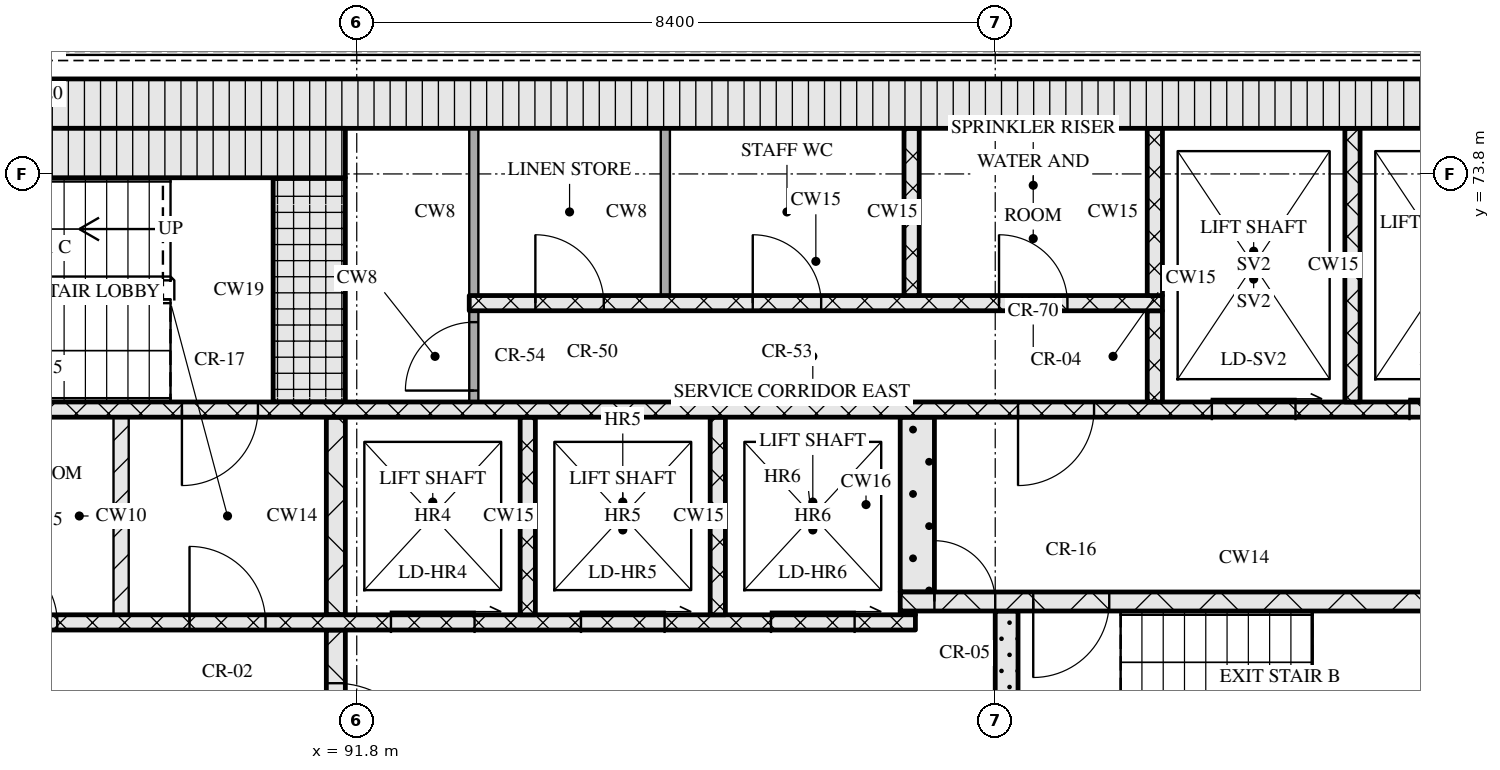
"""IFC4 building model, lengths in metres.
Left out: names, types, materials, properties, quantities, classifications, styles, units other than length and angle.
Written with IfcOpenShell. Run it as: python <this file> out.ifc"""

import sys

from ifc_helpers import new_model, si_unit, direction, frame, frame_2d, origin, place, context, subcontext, project, spatial, rectangle, extrude, element, fill, save


model = new_model("IFC4")
c1 = context("Model", 3, precision=1e-05, world=origin(), true_north=direction((0.0, 1.0)))
c2 = subcontext(c1, "Body", "Model", "MODEL_VIEW")
j1 = project(units=[si_unit("LENGTHUNIT", "METRE"), si_unit("PLANEANGLEUNIT", "RADIAN")], contexts=[c1])
p1 = place(None, origin())
s1 = spatial("IfcSite", under=j1, at=p1, CompositionType="ELEMENT")
p2 = place(p1, origin())
s2 = spatial("IfcBuilding", under=s1, at=p2, CompositionType="ELEMENT")
p3 = place(p2, frame((0.0, 0.0, 209.1)))
s3 = spatial("IfcBuildingStorey", under=s2, at=p3, CompositionType="ELEMENT", Elevation=209.1)
p4 = place(p3, frame((67.15, 74.725, 0.0), z_axis=(0.0, 0.0, 1.0), x_axis=(1.0, 0.0, 0.0)))
e1 = element("IfcWall", 1, at=p4, inside=s3, PredefinedType="SOLIDWALL", context=c2, shape_type="SweptSolid", body=[
    extrude(rectangle(XDim=40.9, YDim=0.65, at=frame_2d((20.45, 0.0))), origin(), (0.0, 0.0, 1.0), 3.32),
])
p5 = place(p3, frame((91.525, 65.2, 0.0), z_axis=(0.0, 0.0, 1.0), x_axis=(0.0, 1.0, 0.0)))
e2 = element("IfcWall", 2, at=p5, inside=s3, PredefinedType="SOLIDWALL", context=c2, shape_type="SweptSolid", body=[
    extrude(rectangle(XDim=2.6, YDim=0.25, at=frame_2d((1.3, 0.0))), origin(), (0.0, 0.0, 1.0), 3.32),
])
p6 = place(p5, frame((0.7, 0.0, 0.0)))
e3 = element("IfcOpeningElement", 3, at=p6, cuts=e2, PredefinedType="OPENING", context=c2, shape_type="SweptSolid", body=[
    extrude(rectangle(XDim=1.2, YDim=2.1, at=frame_2d((0.6, 1.05))), frame((0.0, 0.135, 0.0), z_axis=(0.0, -1.0, 0.0), x_axis=(1.0, 0.0, 0.0)), (0.0, 0.0, 1.0), 0.27),
])
p7 = place(p3, frame((100.35, 65.2, 0.0), z_axis=(0.0, 0.0, 1.0), x_axis=(0.0, 1.0, 0.0)))
e4 = element("IfcWall", 4, at=p7, inside=s3, PredefinedType="SOLIDWALL", context=c2, shape_type="SweptSolid", body=[
    extrude(rectangle(XDim=2.85, YDim=0.3, at=frame_2d((1.425, 0.0))), origin(), (0.0, 0.0, 1.0), 3.32),
])
p8 = place(p3, frame((76.05, 67.9, 0.0), z_axis=(0.0, 0.0, 1.0), x_axis=(1.0, 0.0, 0.0)))
e5 = element("IfcWall", 5, at=p8, inside=s3, PredefinedType="SOLIDWALL", context=c2, shape_type="SweptSolid", body=[
    extrude(rectangle(XDim=23.1, YDim=0.2, at=frame_2d((11.55, 0.0))), origin(), (0.0, 0.0, 1.0), 3.32),
])
p9 = place(p8, frame((1.4, 0.0, 0.0)))
e6 = element("IfcOpeningElement", 6, at=p9, cuts=e5, PredefinedType="OPENING", context=c2, shape_type="SweptSolid", body=[
    extrude(rectangle(XDim=0.9, YDim=2.1, at=frame_2d((0.45, 1.05))), frame((0.0, 0.11, 0.0), z_axis=(0.0, -1.0, 0.0), x_axis=(1.0, 0.0, 0.0)), (0.0, 0.0, 1.0), 0.22),
])
p10 = place(p8, frame((5.11, 0.0, 0.0)))
e7 = element("IfcOpeningElement", 7, at=p10, cuts=e5, PredefinedType="OPENING", context=c2, shape_type="SweptSolid", body=[
    extrude(rectangle(XDim=0.9, YDim=2.1, at=frame_2d((0.45, 1.05))), frame((0.0, 0.11, 0.0), z_axis=(0.0, -1.0, 0.0), x_axis=(1.0, 0.0, 0.0)), (0.0, 0.0, 1.0), 0.22),
])
p11 = place(p8, frame((8.45, 0.0, 0.0)))
e8 = element("IfcOpeningElement", 8, at=p11, cuts=e5, PredefinedType="OPENING", context=c2, shape_type="SweptSolid", body=[
    extrude(rectangle(XDim=0.9, YDim=2.1, at=frame_2d((0.45, 1.05))), frame((0.0, 0.11, 0.0), z_axis=(0.0, -1.0, 0.0), x_axis=(1.0, 0.0, 0.0)), (0.0, 0.0, 1.0), 0.22),
])
p12 = place(p8, frame((10.91, 0.0, 0.0)))
e9 = element("IfcOpeningElement", 9, at=p12, cuts=e5, PredefinedType="OPENING", context=c2, shape_type="SweptSolid", body=[
    extrude(rectangle(XDim=0.9, YDim=2.1, at=frame_2d((0.45, 1.05))), frame((0.0, 0.11, 0.0), z_axis=(0.0, -1.0, 0.0), x_axis=(1.0, 0.0, 0.0)), (0.0, 0.0, 1.0), 0.22),
])
p13 = place(p8, frame((13.55, 0.0, 0.0)))
e10 = element("IfcOpeningElement", 10, at=p13, cuts=e5, PredefinedType="OPENING", context=c2, shape_type="SweptSolid", body=[
    extrude(rectangle(XDim=1.0, YDim=2.1, at=frame_2d((0.5, 1.05))), frame((0.0, 0.11, 0.0), z_axis=(0.0, -1.0, 0.0), x_axis=(1.0, 0.0, 0.0)), (0.0, 0.0, 1.0), 0.22),
])
p14 = place(p8, frame((16.2, 0.0, 0.0)))
e11 = element("IfcOpeningElement", 11, at=p14, cuts=e5, PredefinedType="OPENING", context=c2, shape_type="SweptSolid", body=[
    extrude(rectangle(XDim=1.1, YDim=2.1, at=frame_2d((0.55, 1.05))), frame((0.0, 0.11, 0.0), z_axis=(0.0, -1.0, 0.0), x_axis=(1.0, 0.0, 0.0)), (0.0, 0.0, 1.0), 0.22),
])
p15 = place(p8, frame((18.7, 0.0, 0.0)))
e12 = element("IfcOpeningElement", 12, at=p15, cuts=e5, PredefinedType="OPENING", context=c2, shape_type="SweptSolid", body=[
    extrude(rectangle(XDim=1.1, YDim=2.1, at=frame_2d((0.55, 1.05))), frame((0.0, 0.11, 0.0), z_axis=(0.0, -1.0, 0.0), x_axis=(1.0, 0.0, 0.0)), (0.0, 0.0, 1.0), 0.22),
])
p16 = place(p8, frame((21.2, 0.0, 0.0)))
e13 = element("IfcOpeningElement", 13, at=p16, cuts=e5, PredefinedType="OPENING", context=c2, shape_type="SweptSolid", body=[
    extrude(rectangle(XDim=1.1, YDim=2.1, at=frame_2d((0.55, 1.05))), frame((0.0, 0.11, 0.0), z_axis=(0.0, -1.0, 0.0), x_axis=(1.0, 0.0, 0.0)), (0.0, 0.0, 1.0), 0.22),
])
p17 = place(p3, frame((88.7, 68.0, 0.0), z_axis=(0.0, 0.0, 1.0), x_axis=(0.0, 1.0, 0.0)))
e14 = element("IfcWall", 14, at=p17, inside=s3, PredefinedType="PARTITIONING", context=c2, shape_type="SweptSolid", body=[
    extrude(rectangle(XDim=2.6, YDim=0.2, at=frame_2d((1.3, 0.0))), origin(), (0.0, 0.0, 1.0), 3.32),
])
p18 = place(p3, frame((91.525, 68.0, 0.0), z_axis=(0.0, 0.0, 1.0), x_axis=(0.0, 1.0, 0.0)))
e15 = element("IfcWall", 15, at=p18, inside=s3, PredefinedType="SOLIDWALL", context=c2, shape_type="SweptSolid", body=[
    extrude(rectangle(XDim=2.6, YDim=0.25, at=frame_2d((1.3, 0.0))), origin(), (0.0, 0.0, 1.0), 3.32),
])
for number, where, z_axis, x_axis in (
    (16, (94.05, 68.0, 0.0), (0.0, 0.0, 1.0), (0.0, 1.0, 0.0)),
    (17, (96.55, 68.0, 0.0), (0.0, 0.0, 1.0), (0.0, 1.0, 0.0)),
):
    element("IfcWall", number, at=place(p3, frame(where, z_axis=z_axis, x_axis=x_axis)), inside=s3, PredefinedType="SOLIDWALL", context=c2, shape_type="SweptSolid", body=[
        extrude(rectangle(XDim=2.6, YDim=0.2, at=frame_2d((1.3, 0.0))), origin(), (0.0, 0.0, 1.0), 3.32),
    ])
p19 = place(p3, frame((98.95, 68.025, 0.0), z_axis=(0.0, 0.0, 1.0), x_axis=(1.0, 0.0, 0.0)))
e18 = element("IfcWall", 18, at=p19, inside=s3, PredefinedType="SOLIDWALL", context=c2, shape_type="SweptSolid", body=[
    extrude(rectangle(XDim=0.2, YDim=0.05, at=frame_2d((0.1, 0.0))), origin(), (0.0, 0.0, 1.0), 3.32),
])
p20 = place(p3, frame((98.95, 68.175, 0.0), z_axis=(0.0, 0.0, 1.0), x_axis=(1.0, 0.0, 0.0)))
e19 = element("IfcWall", 19, at=p20, inside=s3, PredefinedType="SOLIDWALL", context=c2, shape_type="SweptSolid", body=[
    extrude(rectangle(XDim=8.45, YDim=0.25, at=frame_2d((4.225, 0.0))), origin(), (0.0, 0.0, 1.0), 3.32),
])
p21 = place(p20, frame((0.45, 0.0, 0.0)))
e20 = element("IfcOpeningElement", 20, at=p21, cuts=e19, PredefinedType="OPENING", context=c2, shape_type="SweptSolid", body=[
    extrude(rectangle(XDim=0.8, YDim=2.1, at=frame_2d((0.4, 1.05))), frame((0.0, 0.135, 0.0), z_axis=(0.0, -1.0, 0.0), x_axis=(1.0, 0.0, 0.0)), (0.0, 0.0, 1.0), 0.27),
])
p22 = place(p20, frame((1.75, 0.0, 0.0)))
e21 = element("IfcOpeningElement", 21, at=p22, cuts=e19, PredefinedType="OPENING", context=c2, shape_type="SweptSolid", body=[
    extrude(rectangle(XDim=1.0, YDim=2.1, at=frame_2d((0.5, 1.05))), frame((0.0, 0.135, 0.0), z_axis=(0.0, -1.0, 0.0), x_axis=(1.0, 0.0, 0.0)), (0.0, 0.0, 1.0), 0.27),
])
p23 = place(p3, frame((99.175, 68.3, 0.0), z_axis=(0.0, 0.0, 1.0), x_axis=(0.0, 1.0, 0.0)))
e22 = element("IfcWall", 22, at=p23, inside=s3, PredefinedType="SOLIDWALL", context=c2, shape_type="SweptSolid", body=[
    extrude(rectangle(XDim=2.3, YDim=0.45, at=frame_2d((1.15, 0.0))), origin(), (0.0, 0.0, 1.0), 3.32),
])
p24 = place(p3, frame((67.8, 70.7, 0.0), z_axis=(0.0, 0.0, 1.0), x_axis=(1.0, 0.0, 0.0)))
e23 = element("IfcWall", 23, at=p24, inside=s3, PredefinedType="SOLIDWALL", context=c2, shape_type="SweptSolid", body=[
    extrude(rectangle(XDim=39.6, YDim=0.2, at=frame_2d((19.8, 0.0))), origin(), (0.0, 0.0, 1.0), 3.32),
])
p25 = place(p24, frame((0.65, 0.0, 0.0)))
e24 = element("IfcOpeningElement", 24, at=p25, cuts=e23, PredefinedType="OPENING", context=c2, shape_type="SweptSolid", body=[
    extrude(rectangle(XDim=1.1, YDim=2.1, at=frame_2d((0.55, 1.05))), frame((0.0, 0.11, 0.0), z_axis=(0.0, -1.0, 0.0), x_axis=(1.0, 0.0, 0.0)), (0.0, 0.0, 1.0), 0.22),
])
p26 = place(p24, frame((3.25, 0.0, 0.0)))
e25 = element("IfcOpeningElement", 25, at=p26, cuts=e23, PredefinedType="OPENING", context=c2, shape_type="SweptSolid", body=[
    extrude(rectangle(XDim=1.1, YDim=2.1, at=frame_2d((0.55, 1.05))), frame((0.0, 0.11, 0.0), z_axis=(0.0, -1.0, 0.0), x_axis=(1.0, 0.0, 0.0)), (0.0, 0.0, 1.0), 0.22),
])
p27 = place(p24, frame((5.9, 0.0, 0.0)))
e26 = element("IfcOpeningElement", 26, at=p27, cuts=e23, PredefinedType="OPENING", context=c2, shape_type="SweptSolid", body=[
    extrude(rectangle(XDim=1.0, YDim=2.1, at=frame_2d((0.5, 1.05))), frame((0.0, 0.11, 0.0), z_axis=(0.0, -1.0, 0.0), x_axis=(1.0, 0.0, 0.0)), (0.0, 0.0, 1.0), 0.22),
])
p28 = place(p24, frame((21.7, 0.0, 0.0)))
e27 = element("IfcOpeningElement", 27, at=p28, cuts=e23, PredefinedType="OPENING", context=c2, shape_type="SweptSolid", body=[
    extrude(rectangle(XDim=1.0, YDim=2.1, at=frame_2d((0.5, 1.05))), frame((0.0, 0.11, 0.0), z_axis=(0.0, -1.0, 0.0), x_axis=(1.0, 0.0, 0.0)), (0.0, 0.0, 1.0), 0.22),
])
p29 = place(p24, frame((32.7, 0.0, 0.0)))
e28 = element("IfcOpeningElement", 28, at=p29, cuts=e23, PredefinedType="OPENING", context=c2, shape_type="SweptSolid", body=[
    extrude(rectangle(XDim=1.0, YDim=2.1, at=frame_2d((0.5, 1.05))), frame((0.0, 0.11, 0.0), z_axis=(0.0, -1.0, 0.0), x_axis=(1.0, 0.0, 0.0)), (0.0, 0.0, 1.0), 0.22),
])
p30 = place(p24, frame((35.25, 0.0, 0.0)))
e29 = element("IfcOpeningElement", 29, at=p30, cuts=e23, PredefinedType="OPENING", context=c2, shape_type="SweptSolid", body=[
    extrude(rectangle(XDim=1.1, YDim=2.1, at=frame_2d((0.55, 1.05))), frame((0.0, 0.11, 0.0), z_axis=(0.0, -1.0, 0.0), x_axis=(1.0, 0.0, 0.0)), (0.0, 0.0, 1.0), 0.22),
])
p31 = place(p24, frame((37.85, 0.0, 0.0)))
e30 = element("IfcOpeningElement", 30, at=p31, cuts=e23, PredefinedType="OPENING", context=c2, shape_type="SweptSolid", body=[
    extrude(rectangle(XDim=1.1, YDim=2.1, at=frame_2d((0.55, 1.05))), frame((0.0, 0.11, 0.0), z_axis=(0.0, -1.0, 0.0), x_axis=(1.0, 0.0, 0.0)), (0.0, 0.0, 1.0), 0.22),
])
p32 = place(p3, frame((91.175, 70.8, 0.0), z_axis=(0.0, 0.0, 1.0), x_axis=(0.0, 1.0, 0.0)))
e31 = element("IfcWall", 31, at=p32, inside=s3, PredefinedType="SOLIDWALL", context=c2, shape_type="SweptSolid", body=[
    extrude(rectangle(XDim=2.95, YDim=0.95, at=frame_2d((1.475, 0.0))), origin(), (0.0, 0.0, 1.0), 3.32),
])
p33 = place(p3, frame((93.34, 70.8, 0.0), z_axis=(0.0, 0.0, 1.0), x_axis=(0.0, 1.0, 0.0)))
e32 = element("IfcWall", 32, at=p33, inside=s3, PredefinedType="PARTITIONING", context=c2, shape_type="SweptSolid", body=[
    extrude(rectangle(XDim=1.2, YDim=0.12, at=frame_2d((0.6, 0.0))), origin(), (0.0, 0.0, 1.0), 3.32),
])
p34 = place(p33, frame((0.15, 0.0, 0.0)))
e33 = element("IfcOpeningElement", 33, at=p34, cuts=e32, PredefinedType="OPENING", context=c2, shape_type="SweptSolid", body=[
    extrude(rectangle(XDim=0.9, YDim=2.1, at=frame_2d((0.45, 1.05))), frame((0.0, 0.07, 0.0), z_axis=(0.0, -1.0, 0.0), x_axis=(1.0, 0.0, 0.0)), (0.0, 0.0, 1.0), 0.14),
])
p35 = place(p3, frame((102.3, 70.8, 0.0), z_axis=(0.0, 0.0, 1.0), x_axis=(0.0, 1.0, 0.0)))
e34 = element("IfcWall", 34, at=p35, inside=s3, PredefinedType="SOLIDWALL", context=c2, shape_type="SweptSolid", body=[
    extrude(rectangle(XDim=1.2, YDim=0.2, at=frame_2d((0.6, 0.0))), origin(), (0.0, 0.0, 1.0), 3.32),
])
p36 = place(p3, frame((104.9, 70.8, 0.0), z_axis=(0.0, 0.0, 1.0), x_axis=(0.0, 1.0, 0.0)))
e35 = element("IfcWall", 35, at=p36, inside=s3, PredefinedType="SOLIDWALL", context=c2, shape_type="SweptSolid", body=[
    extrude(rectangle(XDim=3.6, YDim=0.2, at=frame_2d((1.8, 0.0))), origin(), (0.0, 0.0, 1.0), 3.32),
])
p37 = place(p3, frame((93.28, 72.1, 0.0), z_axis=(0.0, 0.0, 1.0), x_axis=(1.0, 0.0, 0.0)))
e36 = element("IfcWall", 36, at=p37, inside=s3, PredefinedType="SOLIDWALL", context=c2, shape_type="SweptSolid", body=[
    extrude(rectangle(XDim=9.12, YDim=0.2, at=frame_2d((4.56, 0.0))), origin(), (0.0, 0.0, 1.0), 3.32),
])
p38 = place(p37, frame((0.87, 0.0, 0.0)))
e37 = element("IfcOpeningElement", 37, at=p38, cuts=e36, PredefinedType="OPENING", context=c2, shape_type="SweptSolid", body=[
    extrude(rectangle(XDim=0.9, YDim=2.1, at=frame_2d((0.45, 1.05))), frame((0.0, 0.11, 0.0), z_axis=(0.0, -1.0, 0.0), x_axis=(1.0, 0.0, 0.0)), (0.0, 0.0, 1.0), 0.22),
])
p39 = place(p37, frame((3.73, 0.0, 0.0)))
e38 = element("IfcOpeningElement", 38, at=p39, cuts=e36, PredefinedType="OPENING", context=c2, shape_type="SweptSolid", body=[
    extrude(rectangle(XDim=0.9, YDim=2.1, at=frame_2d((0.45, 1.05))), frame((0.0, 0.11, 0.0), z_axis=(0.0, -1.0, 0.0), x_axis=(1.0, 0.0, 0.0)), (0.0, 0.0, 1.0), 0.22),
])
p40 = place(p37, frame((6.97, 0.0, 0.0)))
e39 = element("IfcOpeningElement", 39, at=p40, cuts=e36, PredefinedType="OPENING", context=c2, shape_type="SweptSolid", body=[
    extrude(rectangle(XDim=0.9, YDim=2.1, at=frame_2d((0.45, 1.05))), frame((0.0, 0.11, 0.0), z_axis=(0.0, -1.0, 0.0), x_axis=(1.0, 0.0, 0.0)), (0.0, 0.0, 1.0), 0.22),
])
for number, where, z_axis, x_axis in (
    (40, (93.34, 72.2, 0.0), (0.0, 0.0, 1.0), (0.0, 1.0, 0.0)),
    (41, (95.86, 72.2, 0.0), (0.0, 0.0, 1.0), (0.0, 1.0, 0.0)),
):
    element("IfcWall", number, at=place(p3, frame(where, z_axis=z_axis, x_axis=x_axis)), inside=s3, PredefinedType="PARTITIONING", context=c2, shape_type="SweptSolid", body=[
        extrude(rectangle(XDim=2.2, YDim=0.12, at=frame_2d((1.1, 0.0))), origin(), (0.0, 0.0, 1.0), 3.32),
    ])
for number, where, z_axis, x_axis in (
    (42, (99.1, 72.2, 0.0), (0.0, 0.0, 1.0), (0.0, 1.0, 0.0)),
    (43, (102.3, 72.2, 0.0), (0.0, 0.0, 1.0), (0.0, 1.0, 0.0)),
):
    element("IfcWall", number, at=place(p3, frame(where, z_axis=z_axis, x_axis=x_axis)), inside=s3, PredefinedType="SOLIDWALL", context=c2, shape_type="SweptSolid", body=[
        extrude(rectangle(XDim=2.2, YDim=0.2, at=frame_2d((1.1, 0.0))), origin(), (0.0, 0.0, 1.0), 3.32),
    ])
p41 = place(p3, frame((83.55, 74.075, 0.0), z_axis=(0.0, 0.0, 1.0), x_axis=(1.0, 0.0, 0.0)))
e44 = element("IfcWall", 44, at=p41, inside=s3, PredefinedType="SOLIDWALL", context=c2, shape_type="SweptSolid", body=[
    extrude(rectangle(XDim=8.1, YDim=0.65, at=frame_2d((4.05, 0.0))), origin(), (0.0, 0.0, 1.0), 3.32),
])
p42 = place(p6, origin())
e45 = element("IfcDoor", 45, at=p42, inside=s3, OperationType="SINGLE_SWING_RIGHT", PredefinedType="DOOR", context=c2, shape_type="SweptSolid", body=[
    extrude(rectangle(XDim=1.2, YDim=2.1, at=frame_2d((0.6, 1.05))), frame((0.0, 0.025, 0.0), z_axis=(0.0, -1.0, 0.0), x_axis=(1.0, 0.0, 0.0)), (0.0, 0.0, 1.0), 0.05),
])
fill(e3, e45)
p43 = place(p12, origin())
e46 = element("IfcDoor", 46, at=p43, inside=s3, OperationType="SINGLE_SWING_LEFT", PredefinedType="DOOR", context=c2, shape_type="SweptSolid", body=[
    extrude(rectangle(XDim=0.9, YDim=2.1, at=frame_2d((0.45, 1.05))), frame((0.0, 0.025, 0.0), z_axis=(0.0, -1.0, 0.0), x_axis=(1.0, 0.0, 0.0)), (0.0, 0.0, 1.0), 0.05),
])
fill(e9, e46)
p44 = place(p13, origin())
e47 = element("IfcDoor", 47, at=p44, inside=s3, OperationType="SINGLE_SWING_LEFT", PredefinedType="DOOR", context=c2, shape_type="SweptSolid", body=[
    extrude(rectangle(XDim=1.0, YDim=2.1, at=frame_2d((0.5, 1.05))), frame((0.0, 0.025, 0.0), z_axis=(0.0, -1.0, 0.0), x_axis=(1.0, 0.0, 0.0)), (0.0, 0.0, 1.0), 0.05),
])
fill(e10, e47)
p45 = place(p14, origin())
e48 = element("IfcDoor", 48, at=p45, inside=s3, OperationType="SLIDING_TO_RIGHT", PredefinedType="DOOR", context=c2, shape_type="SweptSolid", body=[
    extrude(rectangle(XDim=1.1, YDim=2.1, at=frame_2d((0.55, 1.05))), frame((0.0, 0.025, 0.0), z_axis=(0.0, -1.0, 0.0), x_axis=(1.0, 0.0, 0.0)), (0.0, 0.0, 1.0), 0.05),
])
fill(e11, e48)
p46 = place(p15, origin())
e49 = element("IfcDoor", 49, at=p46, inside=s3, OperationType="SLIDING_TO_RIGHT", PredefinedType="DOOR", context=c2, shape_type="SweptSolid", body=[
    extrude(rectangle(XDim=1.1, YDim=2.1, at=frame_2d((0.55, 1.05))), frame((0.0, 0.025, 0.0), z_axis=(0.0, -1.0, 0.0), x_axis=(1.0, 0.0, 0.0)), (0.0, 0.0, 1.0), 0.05),
])
fill(e12, e49)
p47 = place(p16, origin())
e50 = element("IfcDoor", 50, at=p47, inside=s3, OperationType="SLIDING_TO_RIGHT", PredefinedType="DOOR", context=c2, shape_type="SweptSolid", body=[
    extrude(rectangle(XDim=1.1, YDim=2.1, at=frame_2d((0.55, 1.05))), frame((0.0, 0.025, 0.0), z_axis=(0.0, -1.0, 0.0), x_axis=(1.0, 0.0, 0.0)), (0.0, 0.0, 1.0), 0.05),
])
fill(e13, e50)
p48 = place(p21, origin())
e51 = element("IfcDoor", 51, at=p48, inside=s3, OperationType="SINGLE_SWING_LEFT", PredefinedType="DOOR", context=c2, shape_type="SweptSolid", body=[
    extrude(rectangle(XDim=0.8, YDim=2.1, at=frame_2d((0.4, 1.05))), frame((0.0, 0.025, 0.0), z_axis=(0.0, -1.0, 0.0), x_axis=(1.0, 0.0, 0.0)), (0.0, 0.0, 1.0), 0.05),
])
fill(e20, e51)
p49 = place(p22, origin())
e52 = element("IfcDoor", 52, at=p49, inside=s3, OperationType="SINGLE_SWING_RIGHT", PredefinedType="DOOR", context=c2, shape_type="SweptSolid", body=[
    extrude(rectangle(XDim=1.0, YDim=2.1, at=frame_2d((0.5, 1.05))), frame((0.0, 0.025, 0.0), z_axis=(0.0, -1.0, 0.0), x_axis=(1.0, 0.0, 0.0)), (0.0, 0.0, 1.0), 0.05),
])
fill(e21, e52)
p50 = place(p28, origin())
e53 = element("IfcDoor", 53, at=p50, inside=s3, OperationType="SINGLE_SWING_RIGHT", PredefinedType="DOOR", context=c2, shape_type="SweptSolid", body=[
    extrude(rectangle(XDim=1.0, YDim=2.1, at=frame_2d((0.5, 1.05))), frame((0.0, 0.025, 0.0), z_axis=(0.0, -1.0, 0.0), x_axis=(1.0, 0.0, 0.0)), (0.0, 0.0, 1.0), 0.05),
])
fill(e27, e53)
p51 = place(p29, origin())
e54 = element("IfcDoor", 54, at=p51, inside=s3, OperationType="SINGLE_SWING_RIGHT", PredefinedType="DOOR", context=c2, shape_type="SweptSolid", body=[
    extrude(rectangle(XDim=1.0, YDim=2.1, at=frame_2d((0.5, 1.05))), frame((0.0, 0.025, 0.0), z_axis=(0.0, -1.0, 0.0), x_axis=(1.0, 0.0, 0.0)), (0.0, 0.0, 1.0), 0.05),
])
fill(e28, e54)
p52 = place(p30, origin())
e55 = element("IfcDoor", 55, at=p52, inside=s3, OperationType="SLIDING_TO_RIGHT", PredefinedType="DOOR", context=c2, shape_type="SweptSolid", body=[
    extrude(rectangle(XDim=1.1, YDim=2.1, at=frame_2d((0.55, 1.05))), frame((0.0, 0.025, 0.0), z_axis=(0.0, -1.0, 0.0), x_axis=(1.0, 0.0, 0.0)), (0.0, 0.0, 1.0), 0.05),
])
fill(e29, e55)
p53 = place(p31, origin())
e56 = element("IfcDoor", 56, at=p53, inside=s3, OperationType="SLIDING_TO_RIGHT", PredefinedType="DOOR", context=c2, shape_type="SweptSolid", body=[
    extrude(rectangle(XDim=1.1, YDim=2.1, at=frame_2d((0.55, 1.05))), frame((0.0, 0.025, 0.0), z_axis=(0.0, -1.0, 0.0), x_axis=(1.0, 0.0, 0.0)), (0.0, 0.0, 1.0), 0.05),
])
fill(e30, e56)
p54 = place(p34, origin())
e57 = element("IfcDoor", 57, at=p54, inside=s3, OperationType="SINGLE_SWING_LEFT", PredefinedType="DOOR", context=c2, shape_type="SweptSolid", body=[
    extrude(rectangle(XDim=0.9, YDim=2.1, at=frame_2d((0.45, 1.05))), frame((0.0, 0.025, 0.0), z_axis=(0.0, -1.0, 0.0), x_axis=(1.0, 0.0, 0.0)), (0.0, 0.0, 1.0), 0.05),
])
fill(e33, e57)
p55 = place(p38, origin())
e58 = element("IfcDoor", 58, at=p55, inside=s3, OperationType="SINGLE_SWING_LEFT", PredefinedType="DOOR", context=c2, shape_type="SweptSolid", body=[
    extrude(rectangle(XDim=0.9, YDim=2.1, at=frame_2d((0.45, 1.05))), frame((0.0, 0.025, 0.0), z_axis=(0.0, -1.0, 0.0), x_axis=(1.0, 0.0, 0.0)), (0.0, 0.0, 1.0), 0.05),
])
fill(e37, e58)
p56 = place(p39, origin())
e59 = element("IfcDoor", 59, at=p56, inside=s3, OperationType="SINGLE_SWING_LEFT", PredefinedType="DOOR", context=c2, shape_type="SweptSolid", body=[
    extrude(rectangle(XDim=0.9, YDim=2.1, at=frame_2d((0.45, 1.05))), frame((0.0, 0.025, 0.0), z_axis=(0.0, -1.0, 0.0), x_axis=(1.0, 0.0, 0.0)), (0.0, 0.0, 1.0), 0.05),
])
fill(e38, e59)
p57 = place(p40, origin())
e60 = element("IfcDoor", 60, at=p57, inside=s3, OperationType="SINGLE_SWING_LEFT", PredefinedType="DOOR", context=c2, shape_type="SweptSolid", body=[
    extrude(rectangle(XDim=0.9, YDim=2.1, at=frame_2d((0.45, 1.05))), frame((0.0, 0.025, 0.0), z_axis=(0.0, -1.0, 0.0), x_axis=(1.0, 0.0, 0.0)), (0.0, 0.0, 1.0), 0.05),
])
fill(e39, e60)
save(model, sys.argv[1])
